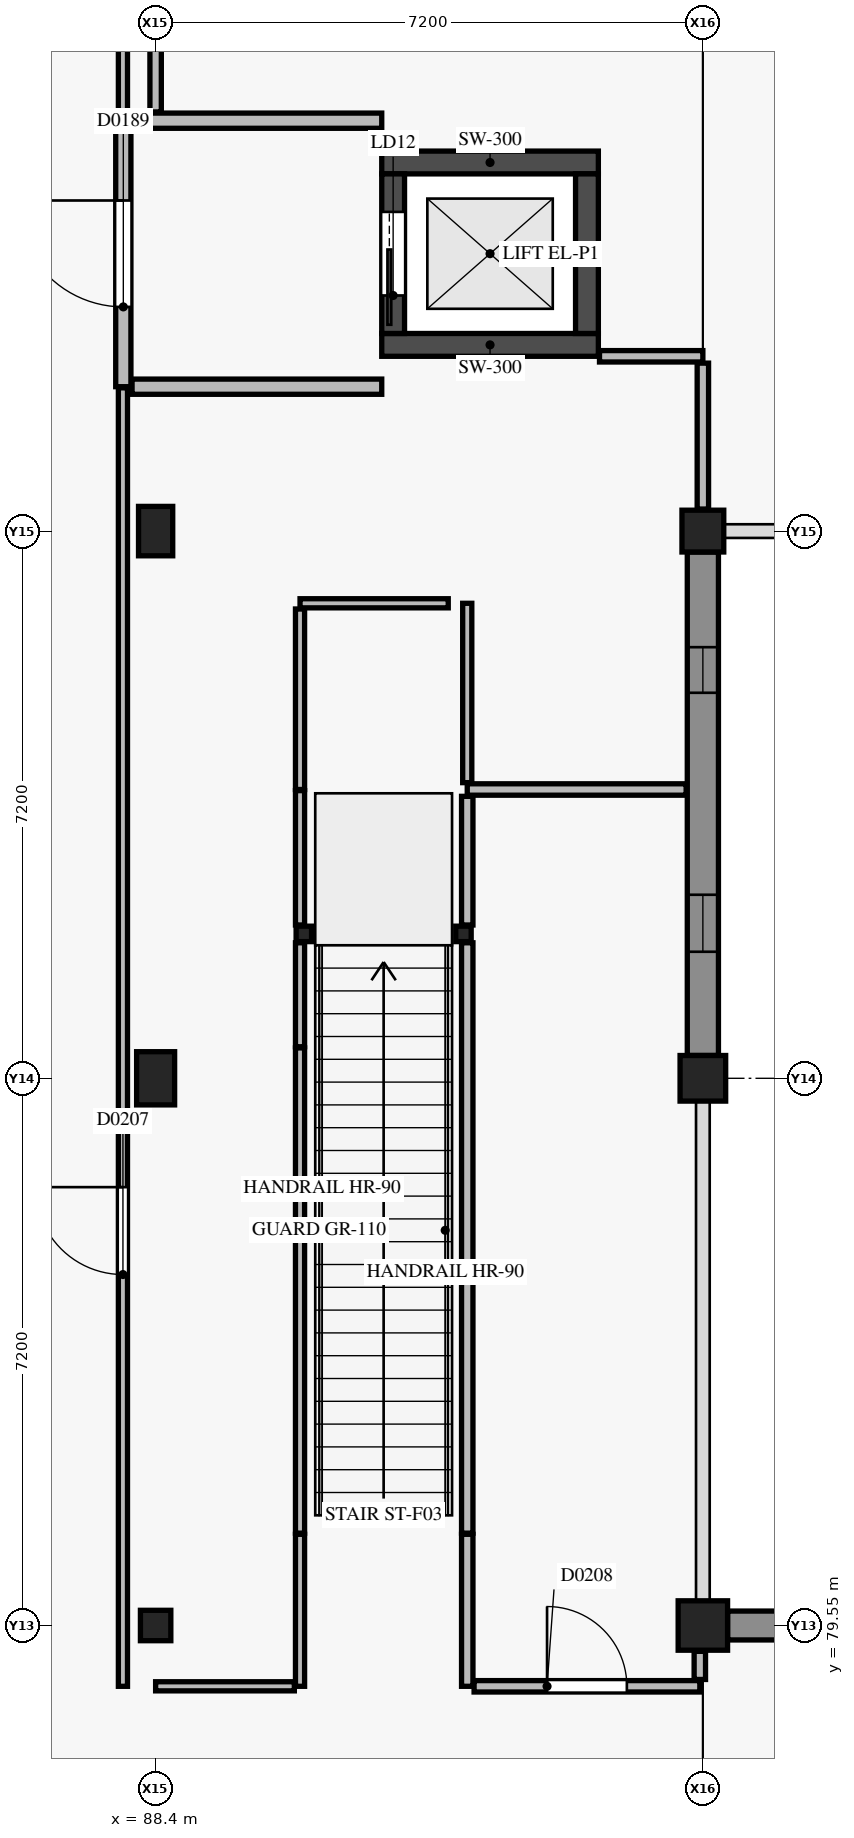
"""IFC4 building model, lengths in metres.
Left out: names, types, materials, properties, quantities, classifications, styles, units other than length and angle.
Written with IfcOpenShell. Run it as: python <this file> out.ifc"""

import sys

from ifc_helpers import new_model, si_unit, direction, frame, frame_2d, origin, origin_2d, place, context, subcontext, project, spatial, rectangle, hollow_rectangle, extrude, element, fill, save


model = new_model("IFC4")
c1 = context("Model", 3, precision=1e-05, world=origin(), true_north=direction((0.0, 1.0)))
c2 = subcontext(c1, "Body", "Model", "MODEL_VIEW")
j1 = project(units=[si_unit("LENGTHUNIT", "METRE"), si_unit("PLANEANGLEUNIT", "RADIAN")], contexts=[c1])
p1 = place(None, origin())
s1 = spatial("IfcSite", under=j1, at=p1, CompositionType="ELEMENT")
p2 = place(p1, origin())
s2 = spatial("IfcBuilding", under=s1, at=p2, CompositionType="ELEMENT")
p3 = place(p2, frame((0.0, 0.0, 4.8)))
s3 = spatial("IfcBuildingStorey", under=s2, at=p3, CompositionType="ELEMENT", Elevation=4.8)
p4 = place(p3, frame((88.4, 79.55, 0.0), z_axis=(0.0, 0.0, 1.0), x_axis=(1.0, 0.0, 0.0)))
e1 = element("IfcColumn", 1, at=p4, inside=s3, PredefinedType="COLUMN", context=c2, shape_type="SweptSolid", body=[
    extrude(rectangle(XDim=0.4, YDim=0.4, at=origin_2d()), origin(), (0.0, 0.0, 1.0), 4.2),
])
p5 = place(p3, frame((88.4, 86.75, 0.0), z_axis=(0.0, 0.0, 1.0), x_axis=(1.0, 0.0, 0.0)))
e2 = element("IfcColumn", 2, at=p5, inside=s3, PredefinedType="COLUMN", context=c2, shape_type="SweptSolid", body=[
    extrude(rectangle(XDim=0.5, YDim=0.7, at=origin_2d()), origin(), (0.0, 0.0, 1.0), 4.2),
])
p6 = place(p3, frame((88.4, 93.95, 0.0), z_axis=(0.0, 0.0, 1.0), x_axis=(1.0, 0.0, 0.0)))
e3 = element("IfcColumn", 3, at=p6, inside=s3, PredefinedType="COLUMN", context=c2, shape_type="SweptSolid", body=[
    extrude(rectangle(XDim=0.45, YDim=0.65, at=origin_2d()), origin(), (0.0, 0.0, 1.0), 4.2),
])
p7 = place(p3, frame((95.6, 79.55, 0.0), z_axis=(0.0, 0.0, 1.0), x_axis=(1.0, 0.0, 0.0)))
e4 = element("IfcColumn", 4, at=p7, inside=s3, PredefinedType="COLUMN", context=c2, shape_type="SweptSolid", body=[
    extrude(rectangle(XDim=0.65, YDim=0.65, at=origin_2d()), origin(), (0.0, 0.0, 1.0), 4.2),
])
p8 = place(p3, frame((95.6, 86.75, 0.0), z_axis=(0.0, 0.0, 1.0), x_axis=(1.0, 0.0, 0.0)))
e5 = element("IfcColumn", 5, at=p8, inside=s3, PredefinedType="COLUMN", context=c2, shape_type="SweptSolid", body=[
    extrude(rectangle(XDim=0.6, YDim=0.6, at=origin_2d()), origin(), (0.0, 0.0, 1.0), 4.2),
])
p9 = place(p3, frame((95.6, 93.95, 0.0), z_axis=(0.0, 0.0, 1.0), x_axis=(1.0, 0.0, 0.0)))
e6 = element("IfcColumn", 6, at=p9, inside=s3, PredefinedType="COLUMN", context=c2, shape_type="SweptSolid", body=[
    extrude(rectangle(XDim=0.55, YDim=0.55, at=origin_2d()), origin(), (0.0, 0.0, 1.0), 4.2),
])
for number, where, z_axis, x_axis in (
    (7, (91.375, 96.4, 0.0), (0.0, 0.0, 1.0), (1.0, 0.0, 0.0)),
    (8, (91.375, 98.8, 0.0), (0.0, 0.0, 1.0), (1.0, 0.0, 0.0)),
):
    element("IfcWall", number, at=place(p3, frame(where, z_axis=z_axis, x_axis=x_axis)), inside=s3, PredefinedType="SHEAR", context=c2, shape_type="SweptSolid", body=[
        extrude(rectangle(XDim=2.85, YDim=0.3, at=frame_2d((1.425, 0.0))), origin(), (0.0, 0.0, 1.0), 3.95),
    ])
p10 = place(p3, frame((91.525, 96.55, 0.0), z_axis=(0.0, 0.0, 1.0), x_axis=(0.0, 1.0, 0.0)))
e9 = element("IfcWall", 9, at=p10, inside=s3, PredefinedType="SHEAR", context=c2, shape_type="SweptSolid", body=[
    extrude(rectangle(XDim=2.1, YDim=0.3, at=frame_2d((1.05, 0.0))), origin(), (0.0, 0.0, 1.0), 3.95),
])
p11 = place(p10, frame((0.5, 0.0, 0.0)))
e10 = element("IfcOpeningElement", 10, at=p11, cuts=e9, PredefinedType="OPENING", context=c2, shape_type="SweptSolid", body=[
    extrude(rectangle(XDim=1.1, YDim=2.15, at=frame_2d((0.55, 1.075))), frame((0.0, 0.16, 0.0), z_axis=(0.0, -1.0, 0.0), x_axis=(1.0, 0.0, 0.0)), (0.0, 0.0, 1.0), 0.32),
])
p12 = place(p3, frame((94.075, 96.55, 0.0), z_axis=(0.0, 0.0, 1.0), x_axis=(0.0, 1.0, 0.0)))
e11 = element("IfcWall", 11, at=p12, inside=s3, PredefinedType="SHEAR", context=c2, shape_type="SweptSolid", body=[
    extrude(rectangle(XDim=2.1, YDim=0.3, at=frame_2d((1.05, 0.0))), origin(), (0.0, 0.0, 1.0), 3.95),
])
p13 = place(p3, frame((95.6, 93.675, 0.0), z_axis=(0.0, 0.0, 1.0), x_axis=(0.0, -1.0, 0.0)))
e12 = element("IfcWall", 12, at=p13, inside=s3, PredefinedType="USERDEFINED", context=c2, shape_type="SweptSolid", body=[
    extrude(rectangle(XDim=6.625, YDim=0.41, at=frame_2d((3.312, 0.0))), origin(), (0.0, 0.0, 1.0), 3.13),
])
p14 = place(p13, frame((1.252, 0.0, 0.9)))
e13 = element("IfcOpeningElement", 13, at=p14, cuts=e12, PredefinedType="OPENING", context=c2, shape_type="SweptSolid", body=[
    extrude(rectangle(XDim=0.6, YDim=1.8, at=frame_2d((0.3, 0.9))), frame((0.0, 0.215, 0.0), z_axis=(0.0, -1.0, 0.0), x_axis=(1.0, 0.0, 0.0)), (0.0, 0.0, 1.0), 0.43),
])
p15 = place(p13, frame((4.51, 0.0, 0.9)))
e14 = element("IfcOpeningElement", 14, at=p15, cuts=e12, PredefinedType="OPENING", context=c2, shape_type="SweptSolid", body=[
    extrude(rectangle(XDim=0.75, YDim=1.8, at=frame_2d((0.375, 0.9))), frame((0.0, 0.215, 0.0), z_axis=(0.0, -1.0, 0.0), x_axis=(1.0, 0.0, 0.0)), (0.0, 0.0, 1.0), 0.43),
])
p16 = place(p3, frame((95.925, 79.55, 0.0), z_axis=(0.0, 0.0, 1.0), x_axis=(1.0, 0.0, 0.0)))
e15 = element("IfcWall", 15, at=p16, inside=s3, PredefinedType="USERDEFINED", context=c2, shape_type="SweptSolid", body=[
    extrude(rectangle(XDim=6.65, YDim=0.38, at=frame_2d((3.325, 0.0))), origin(), (0.0, 0.0, 1.0), 3.13),
])
p17 = place(p16, frame((1.825, 0.0, 0.6)))
e16 = element("IfcOpeningElement", 16, at=p17, cuts=e15, PredefinedType="OPENING", context=c2, shape_type="SweptSolid", body=[
    extrude(rectangle(XDim=3.0, YDim=2.2, at=frame_2d((1.5, 1.1))), frame((0.0, 0.2, 0.0), z_axis=(0.0, -1.0, 0.0), x_axis=(1.0, 0.0, 0.0)), (0.0, 0.0, 1.0), 0.4),
])
for number, where, z_axis, x_axis in (
    (17, (90.35, 88.65, 0.0), (0.0, 0.0, 1.0), (1.0, 0.0, 0.0)),
    (18, (92.45, 88.65, 0.0), (0.0, 0.0, 1.0), (1.0, 0.0, 0.0)),
):
    element("IfcColumn", number, at=place(p3, frame(where, z_axis=z_axis, x_axis=x_axis)), inside=s3, PredefinedType="COLUMN", context=c2, shape_type="SweptSolid", body=[
        extrude(hollow_rectangle(XDim=0.203, YDim=0.203, WallThickness=0.012, at=origin_2d()), origin(), (0.0, 0.0, 1.0), 4.0),
    ])
p18 = place(p3, frame((87.975, 95.85, 0.0), z_axis=(0.0, 0.0, 1.0), x_axis=(0.0, 1.0, 0.0)))
e19 = element("IfcWall", 19, at=p18, inside=s3, PredefinedType="PARTITIONING", context=c2, shape_type="SweptSolid", body=[
    extrude(rectangle(XDim=3.5, YDim=0.2, at=frame_2d((1.75, 0.0))), origin(), (0.0, 0.0, 1.0), 3.475),
])
p19 = place(p18, frame((1.05, 0.0, 0.0)))
e20 = element("IfcOpeningElement", 20, at=p19, cuts=e19, PredefinedType="OPENING", context=c2, shape_type="SweptSolid", body=[
    extrude(rectangle(XDim=1.4, YDim=2.2, at=frame_2d((0.7, 1.1))), frame((0.0, 0.11, 0.0), z_axis=(0.0, -1.0, 0.0), x_axis=(1.0, 0.0, 0.0)), (0.0, 0.0, 1.0), 0.22),
])
for number, where, z_axis, x_axis in (
    (21, (88.09, 99.35, 0.0), (0.0, 0.0, 1.0), (1.0, 0.0, 0.0)),
    (22, (88.09, 95.85, 0.0), (0.0, 0.0, 1.0), (1.0, 0.0, 0.0)),
):
    element("IfcWall", number, at=place(p3, frame(where, z_axis=z_axis, x_axis=x_axis)), inside=s3, PredefinedType="PARTITIONING", context=c2, shape_type="SweptSolid", body=[
        extrude(rectangle(XDim=3.285, YDim=0.2, at=frame_2d((1.643, 0.0))), origin(), (0.0, 0.0, 1.0), 3.355),
    ])
p20 = place(p3, frame((92.5, 78.75, 0.0), z_axis=(0.0, 0.0, 1.0), x_axis=(0.0, 1.0, 0.0)))
e23 = element("IfcWall", 23, at=p20, inside=s3, PredefinedType="PARTITIONING", context=c2, shape_type="SweptSolid", body=[
    extrude(rectangle(XDim=2.0, YDim=0.15, at=frame_2d((1.0, 0.0))), origin(), (0.0, 0.0, 1.0), 2.415),
])
p21 = place(p3, frame((92.59, 78.75, 0.0), z_axis=(0.0, 0.0, 1.0), x_axis=(1.0, 0.0, 0.0)))
e24 = element("IfcWall", 24, at=p21, inside=s3, PredefinedType="PARTITIONING", context=c2, shape_type="SweptSolid", body=[
    extrude(rectangle(XDim=2.97, YDim=0.15, at=frame_2d((1.485, 0.0))), origin(), (0.0, 0.0, 1.0), 3.285),
])
p22 = place(p21, frame((0.96, 0.0, 0.0)))
e25 = element("IfcOpeningElement", 25, at=p22, cuts=e24, PredefinedType="OPENING", context=c2, shape_type="SweptSolid", body=[
    extrude(rectangle(XDim=1.05, YDim=2.15, at=frame_2d((0.525, 1.075))), frame((0.0, 0.085, 0.0), z_axis=(0.0, -1.0, 0.0), x_axis=(1.0, 0.0, 0.0)), (0.0, 0.0, 1.0), 0.17),
])
p23 = place(p3, frame((90.3, 78.75, 0.0), z_axis=(0.0, 0.0, 1.0), x_axis=(0.0, 1.0, 0.0)))
e26 = element("IfcWall", 26, at=p23, inside=s3, PredefinedType="PARTITIONING", context=c2, shape_type="SweptSolid", body=[
    extrude(rectangle(XDim=2.0, YDim=0.12, at=frame_2d((1.0, 0.0))), origin(), (0.0, 0.0, 1.0), 2.415),
])
p24 = place(p3, frame((88.4, 78.75, 0.0), z_axis=(0.0, 0.0, 1.0), x_axis=(1.0, 0.0, 0.0)))
e27 = element("IfcWall", 27, at=p24, inside=s3, PredefinedType="PARTITIONING", context=c2, shape_type="SweptSolid", body=[
    extrude(rectangle(XDim=1.825, YDim=0.12, at=frame_2d((0.913, 0.0))), origin(), (0.0, 0.0, 1.0), 3.385),
])
p25 = place(p3, frame((87.97, 78.75, 0.0), z_axis=(0.0, 0.0, 1.0), x_axis=(0.0, 1.0, 0.0)))
e28 = element("IfcWall", 28, at=p25, inside=s3, PredefinedType="PARTITIONING", context=c2, shape_type="SweptSolid", body=[
    extrude(rectangle(XDim=17.085, YDim=0.12, at=frame_2d((8.542, 0.0))), origin(), (0.0, 0.0, 1.0), 3.285),
])
p26 = place(p25, frame((5.418, 0.0, 0.0)))
e29 = element("IfcOpeningElement", 29, at=p26, cuts=e28, PredefinedType="OPENING", context=c2, shape_type="SweptSolid", body=[
    extrude(rectangle(XDim=1.15, YDim=2.15, at=frame_2d((0.575, 1.075))), frame((0.0, 0.07, 0.0), z_axis=(0.0, -1.0, 0.0), x_axis=(1.0, 0.0, 0.0)), (0.0, 0.0, 1.0), 0.14),
])
p27 = place(p3, frame((87.97, 99.365, 0.0), z_axis=(0.0, 0.0, 1.0), x_axis=(0.0, 1.0, 0.0)))
e30 = element("IfcWall", 30, at=p27, inside=s3, PredefinedType="PARTITIONING", context=c2, shape_type="SweptSolid", body=[
    extrude(rectangle(XDim=1.135, YDim=0.12, at=frame_2d((0.567, 0.0))), origin(), (0.0, 0.0, 1.0), 3.95),
])
p28 = place(p3, frame((88.4, 99.465, 0.0), z_axis=(0.0, 0.0, 1.0), x_axis=(0.0, 1.0, 0.0)))
e31 = element("IfcWall", 31, at=p28, inside=s3, PredefinedType="PARTITIONING", context=c2, shape_type="SweptSolid", body=[
    extrude(rectangle(XDim=1.37, YDim=0.15, at=frame_2d((0.685, 0.0))), origin(), (0.0, 0.0, 1.0), 3.355),
])
p29 = place(p3, frame((94.24, 96.25, 0.0), z_axis=(0.0, 0.0, 1.0), x_axis=(1.0, 0.0, 0.0)))
e32 = element("IfcWall", 32, at=p29, inside=s3, PredefinedType="PARTITIONING", context=c2, shape_type="SweptSolid", body=[
    extrude(rectangle(XDim=1.36, YDim=0.15, at=frame_2d((0.68, 0.0))), origin(), (0.0, 0.0, 1.0), 3.455),
])
p30 = place(p3, frame((95.6, 94.24, 0.0), z_axis=(0.0, 0.0, 1.0), x_axis=(0.0, 1.0, 0.0)))
e33 = element("IfcWall", 33, at=p30, inside=s3, PredefinedType="PARTITIONING", context=c2, shape_type="SweptSolid", body=[
    extrude(rectangle(XDim=1.92, YDim=0.15, at=frame_2d((0.96, 0.0))), origin(), (0.0, 0.0, 1.0), 3.455),
])
p31 = place(p3, frame((92.5, 90.55, 0.0), z_axis=(0.0, 0.0, 1.0), x_axis=(1.0, 0.0, 0.0)))
e34 = element("IfcWall", 34, at=p31, inside=s3, PredefinedType="PARTITIONING", context=c2, shape_type="SweptSolid", body=[
    extrude(rectangle(XDim=2.88, YDim=0.15, at=frame_2d((1.44, 0.0))), origin(), (0.0, 0.0, 1.0), 3.95),
])
p32 = place(p3, frame((92.5, 80.765, 0.0), z_axis=(0.0, 0.0, 1.0), x_axis=(0.0, 1.0, 0.0)))
e35 = element("IfcWall", 35, at=p32, inside=s3, PredefinedType="PARTITIONING", context=c2, shape_type="SweptSolid", body=[
    extrude(rectangle(XDim=7.768, YDim=0.15, at=frame_2d((3.884, 0.0))), origin(), (0.0, 0.0, 1.0), 3.95),
])
p33 = place(p3, frame((92.5, 88.767, 0.0), z_axis=(0.0, 0.0, 1.0), x_axis=(0.0, 1.0, 0.0)))
e36 = element("IfcWall", 36, at=p33, inside=s3, PredefinedType="PARTITIONING", context=c2, shape_type="SweptSolid", body=[
    extrude(rectangle(XDim=1.693, YDim=0.15, at=frame_2d((0.846, 0.0))), origin(), (0.0, 0.0, 1.0), 3.95),
])
p34 = place(p3, frame((95.56, 78.84, 0.0), z_axis=(0.0, 0.0, 1.0), x_axis=(0.0, 1.0, 0.0)))
e37 = element("IfcWall", 37, at=p34, inside=s3, PredefinedType="PARTITIONING", context=c2, shape_type="SweptSolid", body=[
    extrude(rectangle(XDim=0.37, YDim=0.15, at=frame_2d((0.185, 0.0))), origin(), (0.0, 0.0, 1.0), 3.285),
])
p35 = place(p3, frame((90.3, 80.765, 0.0), z_axis=(0.0, 0.0, 1.0), x_axis=(0.0, 1.0, 0.0)))
e38 = element("IfcWall", 38, at=p35, inside=s3, PredefinedType="PARTITIONING", context=c2, shape_type="SweptSolid", body=[
    extrude(rectangle(XDim=6.385, YDim=0.12, at=frame_2d((3.192, 0.0))), origin(), (0.0, 0.0, 1.0), 3.95),
])
p36 = place(p3, frame((92.5, 90.64, 0.0), z_axis=(0.0, 0.0, 1.0), x_axis=(0.0, 1.0, 0.0)))
e39 = element("IfcWall", 39, at=p36, inside=s3, PredefinedType="PARTITIONING", context=c2, shape_type="SweptSolid", body=[
    extrude(rectangle(XDim=2.36, YDim=0.12, at=frame_2d((1.18, 0.0))), origin(), (0.0, 0.0, 1.0), 3.475),
])
p37 = place(p3, frame((90.3, 93.0, 0.0), z_axis=(0.0, 0.0, 1.0), x_axis=(1.0, 0.0, 0.0)))
e40 = element("IfcWall", 40, at=p37, inside=s3, PredefinedType="PARTITIONING", context=c2, shape_type="SweptSolid", body=[
    extrude(rectangle(XDim=1.95, YDim=0.12, at=frame_2d((0.975, 0.0))), origin(), (0.0, 0.0, 1.0), 3.95),
])
p38 = place(p3, frame((90.3, 90.55, 0.0), z_axis=(0.0, 0.0, 1.0), x_axis=(0.0, 1.0, 0.0)))
e41 = element("IfcWall", 41, at=p38, inside=s3, PredefinedType="PARTITIONING", context=c2, shape_type="SweptSolid", body=[
    extrude(rectangle(XDim=2.375, YDim=0.12, at=frame_2d((1.188, 0.0))), origin(), (0.0, 0.0, 1.0), 3.475),
])
p39 = place(p3, frame((90.3, 87.165, 0.0), z_axis=(0.0, 0.0, 1.0), x_axis=(0.0, 1.0, 0.0)))
e42 = element("IfcWall", 42, at=p39, inside=s3, PredefinedType="PARTITIONING", context=c2, shape_type="SweptSolid", body=[
    extrude(rectangle(XDim=1.368, YDim=0.12, at=frame_2d((0.684, 0.0))), origin(), (0.0, 0.0, 1.0), 3.95),
])
p40 = place(p3, frame((90.3, 88.767, 0.0), z_axis=(0.0, 0.0, 1.0), x_axis=(0.0, 1.0, 0.0)))
e43 = element("IfcWall", 43, at=p40, inside=s3, PredefinedType="PARTITIONING", context=c2, shape_type="SweptSolid", body=[
    extrude(rectangle(XDim=1.768, YDim=0.12, at=frame_2d((0.884, 0.0))), origin(), (0.0, 0.0, 1.0), 3.95),
])
p41 = place(p14, origin())
e44 = element("IfcWindow", 44, at=p41, inside=s3, PartitioningType="SINGLE_PANEL", PredefinedType="WINDOW", context=c2, shape_type="SweptSolid", body=[
    extrude(rectangle(XDim=0.6, YDim=1.8, at=frame_2d((0.3, 0.9))), frame((0.0, 0.03, 0.0), z_axis=(0.0, -1.0, 0.0), x_axis=(1.0, 0.0, 0.0)), (0.0, 0.0, 1.0), 0.06),
])
fill(e13, e44)
p42 = place(p15, origin())
e45 = element("IfcWindow", 45, at=p42, inside=s3, PartitioningType="SINGLE_PANEL", PredefinedType="WINDOW", context=c2, shape_type="SweptSolid", body=[
    extrude(rectangle(XDim=0.75, YDim=1.8, at=frame_2d((0.375, 0.9))), frame((0.0, 0.03, 0.0), z_axis=(0.0, -1.0, 0.0), x_axis=(1.0, 0.0, 0.0)), (0.0, 0.0, 1.0), 0.06),
])
fill(e14, e45)
p43 = place(p11, origin())
e46 = element("IfcDoor", 46, at=p43, inside=s3, OperationType="SLIDING_TO_LEFT", PredefinedType="DOOR", context=c2, shape_type="SweptSolid", body=[
    extrude(rectangle(XDim=1.1, YDim=2.15, at=frame_2d((0.55, 1.075))), frame((0.0, 0.025, 0.0), z_axis=(0.0, -1.0, 0.0), x_axis=(1.0, 0.0, 0.0)), (0.0, 0.0, 1.0), 0.05),
])
fill(e10, e46)
p44 = place(p19, origin())
e47 = element("IfcDoor", 47, at=p44, inside=s3, OperationType="SINGLE_SWING_RIGHT", PredefinedType="DOOR", context=c2, shape_type="SweptSolid", body=[
    extrude(rectangle(XDim=1.4, YDim=2.2, at=frame_2d((0.7, 1.1))), frame((0.0, 0.025, 0.0), z_axis=(0.0, -1.0, 0.0), x_axis=(1.0, 0.0, 0.0)), (0.0, 0.0, 1.0), 0.05),
])
fill(e20, e47)
p45 = place(p26, origin())
e48 = element("IfcDoor", 48, at=p45, inside=s3, OperationType="SINGLE_SWING_RIGHT", PredefinedType="DOOR", context=c2, shape_type="SweptSolid", body=[
    extrude(rectangle(XDim=1.15, YDim=2.15, at=frame_2d((0.575, 1.075))), frame((0.0, 0.025, 0.0), z_axis=(0.0, -1.0, 0.0), x_axis=(1.0, 0.0, 0.0)), (0.0, 0.0, 1.0), 0.05),
])
fill(e29, e48)
p46 = place(p22, origin())
e49 = element("IfcDoor", 49, at=p46, inside=s3, OperationType="SINGLE_SWING_LEFT", PredefinedType="DOOR", context=c2, shape_type="SweptSolid", body=[
    extrude(rectangle(XDim=1.05, YDim=2.15, at=frame_2d((0.525, 1.075))), frame((0.0, 0.025, 0.0), z_axis=(0.0, -1.0, 0.0), x_axis=(1.0, 0.0, 0.0)), (0.0, 0.0, 1.0), 0.05),
])
fill(e25, e49)
save(model, sys.argv[1])
